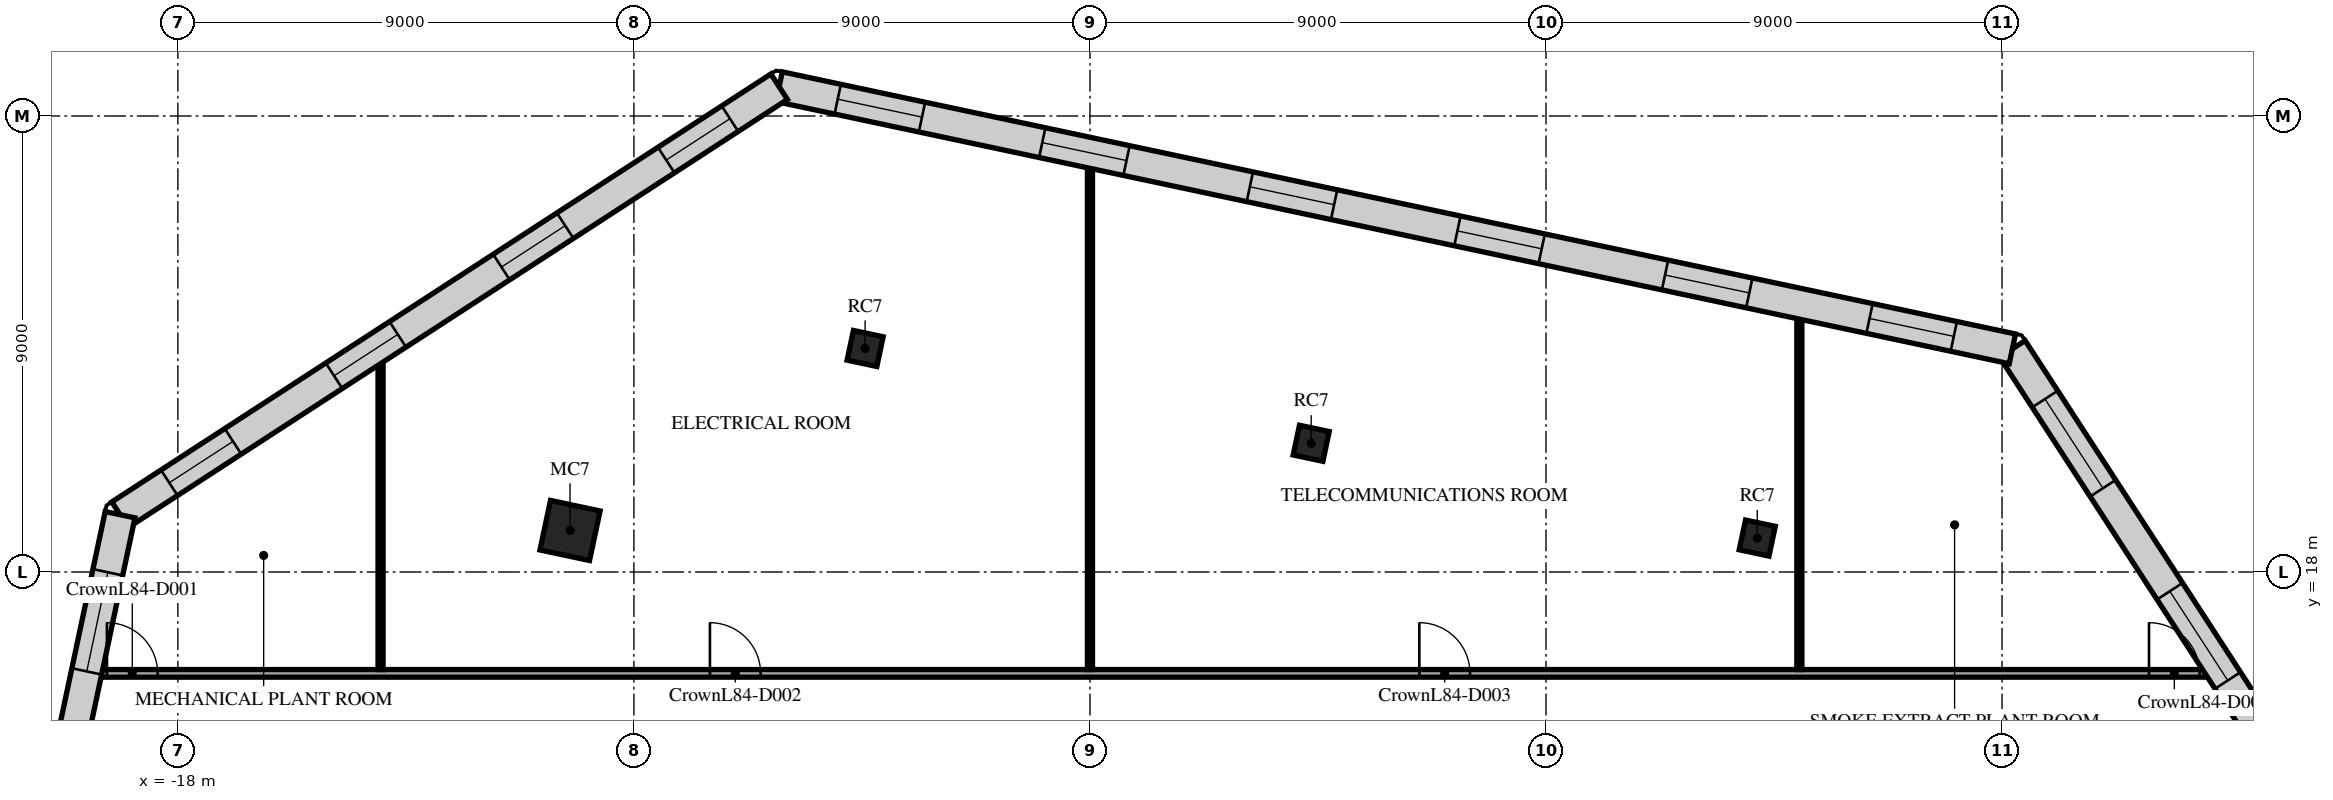
"""IFC4 building model, lengths in metres.
Left out: names, types, materials, properties, quantities, classifications, styles, units other than length and angle.
Written with IfcOpenShell. Run it as: python <this file> out.ifc"""

import sys

from ifc_helpers import new_model, si_unit, direction, frame, frame_2d, origin, origin_2d, place, context, subcontext, project, spatial, rectangle, extrude, element, fill, save


model = new_model("IFC4")
c1 = context("Model", 3, precision=1e-05, world=origin(), true_north=direction((0.0, 1.0)))
c2 = subcontext(c1, "Body", "Model", "MODEL_VIEW")
j1 = project(units=[si_unit("LENGTHUNIT", "METRE"), si_unit("PLANEANGLEUNIT", "RADIAN")], contexts=[c1])
p1 = place(None, origin())
s1 = spatial("IfcSite", under=j1, at=p1, CompositionType="ELEMENT")
p2 = place(p1, origin())
s2 = spatial("IfcBuilding", under=s1, at=p2, CompositionType="ELEMENT")
p3 = place(p2, frame((0.0, 0.0, 358.1)))
s3 = spatial("IfcBuildingStorey", under=s2, at=p3, CompositionType="ELEMENT", Elevation=358.1)
p4 = place(p3, frame((-10.261, 18.82, 0.0), z_axis=(0.0, 0.0, 1.0), x_axis=(0.207911690818, 0.978147600734, 0.0)))
e1 = element("IfcColumn", 1, at=p4, inside=s3, PredefinedType="COLUMN", context=c2, shape_type="SweptSolid", body=[
    extrude(rectangle(XDim=1.0, YDim=1.0, at=origin_2d()), origin(), (0.0, 0.0, 1.0), 5.0),
])
for number, where, z_axis, x_axis in (
    (2, (13.169, 18.67, 0.0), (0.0, 0.0, 1.0), (0.208, 0.978, 0.0)),
    (3, (4.366, 20.541, 0.0), (0.0, 0.0, 1.0), (0.208, 0.978, 0.0)),
    (4, (-4.437, 22.412, 0.0), (0.0, 0.0, 1.0), (0.208, 0.978, 0.0)),
):
    element("IfcColumn", number, at=place(p3, frame(where, z_axis=z_axis, x_axis=x_axis)), inside=s3, PredefinedType="COLUMN", context=c2, shape_type="SweptSolid", body=[
        extrude(rectangle(XDim=0.6, YDim=0.6, at=origin_2d()), origin(), (0.0, 0.0, 1.0), 5.0),
    ])
p5 = place(p3, frame((-19.704, 16.0, 0.0), z_axis=(0.0, 0.0, 1.0), x_axis=(1.0, 0.0, 0.0)))
e5 = element("IfcWall", 5, at=p5, inside=s3, PredefinedType="PARTITIONING", context=c2, shape_type="SweptSolid", body=[
    extrude(rectangle(XDim=41.948, YDim=0.15, at=frame_2d((20.974, 0.0))), origin(), (0.0, 0.0, 1.0), 4.32),
])
p6 = place(p5, frame((0.304, 0.0, 0.0)))
e6 = element("IfcOpeningElement", 6, at=p6, cuts=e5, PredefinedType="OPENING", context=c2, shape_type="SweptSolid", body=[
    extrude(rectangle(XDim=1.0, YDim=2.1, at=frame_2d((0.5, 1.05))), frame((0.0, 0.085, 0.0), z_axis=(0.0, -1.0, 0.0), x_axis=(1.0, 0.0, 0.0)), (0.0, 0.0, 1.0), 0.17),
])
p7 = place(p5, frame((12.204, 0.0, 0.0)))
e7 = element("IfcOpeningElement", 7, at=p7, cuts=e5, PredefinedType="OPENING", context=c2, shape_type="SweptSolid", body=[
    extrude(rectangle(XDim=1.0, YDim=2.1, at=frame_2d((0.5, 1.05))), frame((0.0, 0.085, 0.0), z_axis=(0.0, -1.0, 0.0), x_axis=(1.0, 0.0, 0.0)), (0.0, 0.0, 1.0), 0.17),
])
p8 = place(p5, frame((26.204, 0.0, 0.0)))
e8 = element("IfcOpeningElement", 8, at=p8, cuts=e5, PredefinedType="OPENING", context=c2, shape_type="SweptSolid", body=[
    extrude(rectangle(XDim=1.0, YDim=2.1, at=frame_2d((0.5, 1.05))), frame((0.0, 0.085, 0.0), z_axis=(0.0, -1.0, 0.0), x_axis=(1.0, 0.0, 0.0)), (0.0, 0.0, 1.0), 0.17),
])
p9 = place(p5, frame((40.604, 0.0, 0.0)))
e9 = element("IfcOpeningElement", 9, at=p9, cuts=e5, PredefinedType="OPENING", context=c2, shape_type="SweptSolid", body=[
    extrude(rectangle(XDim=1.0, YDim=2.1, at=frame_2d((0.5, 1.05))), frame((0.0, 0.085, 0.0), z_axis=(0.0, -1.0, 0.0), x_axis=(1.0, 0.0, 0.0)), (0.0, 0.0, 1.0), 0.17),
])
p10 = place(p3, frame((-14.0, 16.075, 0.0), z_axis=(0.0, 0.0, 1.0), x_axis=(0.0, 1.0, 0.0)))
e10 = element("IfcWall", 10, at=p10, inside=s3, PredefinedType="PARTITIONING", context=c2, shape_type="SweptSolid", body=[
    extrude(rectangle(XDim=6.275, YDim=0.1, at=frame_2d((3.138, 0.0))), origin(), (0.0, 0.0, 1.0), 4.7),
])
p11 = place(p3, frame((0.0, 16.075, 0.0), z_axis=(0.0, 0.0, 1.0), x_axis=(0.0, 1.0, 0.0)))
e11 = element("IfcWall", 11, at=p11, inside=s3, PredefinedType="PARTITIONING", context=c2, shape_type="SweptSolid", body=[
    extrude(rectangle(XDim=10.097, YDim=0.1, at=frame_2d((5.048, 0.0))), origin(), (0.0, 0.0, 1.0), 4.7),
])
p12 = place(p3, frame((14.0, 16.075, 0.0), z_axis=(0.0, 0.0, 1.0), x_axis=(0.0, 1.0, 0.0)))
e12 = element("IfcWall", 12, at=p12, inside=s3, PredefinedType="PARTITIONING", context=c2, shape_type="SweptSolid", body=[
    extrude(rectangle(XDim=7.121, YDim=0.1, at=frame_2d((3.561, 0.0))), origin(), (0.0, 0.0, 1.0), 4.32),
])
p13 = place(p3, frame((25.561, 11.075, 0.0), z_axis=(0.0, 0.0, 1.0), x_axis=(-0.544642093959, 0.838668581436, 0.0)))
e13 = element("IfcWall", 13, at=p13, inside=s3, PredefinedType="STANDARD", context=c2, shape_type="SweptSolid", body=[
    extrude(rectangle(XDim=13.509, YDim=0.6, at=frame_2d((6.754, 0.0))), origin(), (0.0, 0.0, 1.0), 4.7),
])
p14 = place(p13, frame((1.181, 0.0, 0.6)))
e14 = element("IfcOpeningElement", 14, at=p14, cuts=e13, PredefinedType="OPENING", context=c2, shape_type="SweptSolid", body=[
    extrude(rectangle(XDim=2.1, YDim=3.35, at=frame_2d((1.05, 1.675))), frame((0.0, 0.31, 0.0), z_axis=(0.0, -1.0, 0.0), x_axis=(1.0, 0.0, 0.0)), (0.0, 0.0, 1.0), 0.62),
])
p15 = place(p13, frame((5.704, 0.0, 0.6)))
e15 = element("IfcOpeningElement", 15, at=p15, cuts=e13, PredefinedType="OPENING", context=c2, shape_type="SweptSolid", body=[
    extrude(rectangle(XDim=2.1, YDim=3.35, at=frame_2d((1.05, 1.675))), frame((0.0, 0.31, 0.0), z_axis=(0.0, -1.0, 0.0), x_axis=(1.0, 0.0, 0.0)), (0.0, 0.0, 1.0), 0.62),
])
p16 = place(p13, frame((10.228, 0.0, 0.6)))
e16 = element("IfcOpeningElement", 16, at=p16, cuts=e13, PredefinedType="OPENING", context=c2, shape_type="SweptSolid", body=[
    extrude(rectangle(XDim=2.1, YDim=3.35, at=frame_2d((1.05, 1.675))), frame((0.0, 0.31, 0.0), z_axis=(0.0, -1.0, 0.0), x_axis=(1.0, 0.0, 0.0)), (0.0, 0.0, 1.0), 0.62),
])
p17 = place(p3, frame((18.204, 22.405, 0.0), z_axis=(0.0, 0.0, 1.0), x_axis=(-0.978147852091, 0.20791050827, 0.0)))
e17 = element("IfcWall", 17, at=p17, inside=s3, PredefinedType="STANDARD", context=c2, shape_type="SweptSolid", body=[
    extrude(rectangle(XDim=24.881, YDim=0.6, at=frame_2d((12.441, 0.0))), origin(), (0.0, 0.0, 1.0), 4.7),
])
p18 = place(p17, frame((1.182, 0.0, 0.6)))
e18 = element("IfcOpeningElement", 18, at=p18, cuts=e17, PredefinedType="OPENING", context=c2, shape_type="SweptSolid", body=[
    extrude(rectangle(XDim=1.7, YDim=3.35, at=frame_2d((0.85, 1.675))), frame((0.0, 0.31, 0.0), z_axis=(0.0, -1.0, 0.0), x_axis=(1.0, 0.0, 0.0)), (0.0, 0.0, 1.0), 0.62),
])
p19 = place(p17, frame((5.308, 0.0, 0.6)))
e19 = element("IfcOpeningElement", 19, at=p19, cuts=e17, PredefinedType="OPENING", context=c2, shape_type="SweptSolid", body=[
    extrude(rectangle(XDim=1.7, YDim=3.35, at=frame_2d((0.85, 1.675))), frame((0.0, 0.31, 0.0), z_axis=(0.0, -1.0, 0.0), x_axis=(1.0, 0.0, 0.0)), (0.0, 0.0, 1.0), 0.62),
])
p20 = place(p17, frame((9.497, 0.0, 0.6)))
e20 = element("IfcOpeningElement", 20, at=p20, cuts=e17, PredefinedType="OPENING", context=c2, shape_type="SweptSolid", body=[
    extrude(rectangle(XDim=1.7, YDim=3.35, at=frame_2d((0.85, 1.675))), frame((0.0, 0.31, 0.0), z_axis=(0.0, -1.0, 0.0), x_axis=(1.0, 0.0, 0.0)), (0.0, 0.0, 1.0), 0.62),
])
p21 = place(p17, frame((13.685, 0.0, 0.6)))
e21 = element("IfcOpeningElement", 21, at=p21, cuts=e17, PredefinedType="OPENING", context=c2, shape_type="SweptSolid", body=[
    extrude(rectangle(XDim=1.7, YDim=3.35, at=frame_2d((0.85, 1.675))), frame((0.0, 0.31, 0.0), z_axis=(0.0, -1.0, 0.0), x_axis=(1.0, 0.0, 0.0)), (0.0, 0.0, 1.0), 0.62),
])
p22 = place(p17, frame((17.873, 0.0, 0.6)))
e22 = element("IfcOpeningElement", 22, at=p22, cuts=e17, PredefinedType="OPENING", context=c2, shape_type="SweptSolid", body=[
    extrude(rectangle(XDim=1.7, YDim=3.35, at=frame_2d((0.85, 1.675))), frame((0.0, 0.31, 0.0), z_axis=(0.0, -1.0, 0.0), x_axis=(1.0, 0.0, 0.0)), (0.0, 0.0, 1.0), 0.62),
])
p23 = place(p17, frame((22.0, 0.0, 0.6)))
e23 = element("IfcOpeningElement", 23, at=p23, cuts=e17, PredefinedType="OPENING", context=c2, shape_type="SweptSolid", body=[
    extrude(rectangle(XDim=1.7, YDim=3.35, at=frame_2d((0.85, 1.675))), frame((0.0, 0.31, 0.0), z_axis=(0.0, -1.0, 0.0), x_axis=(1.0, 0.0, 0.0)), (0.0, 0.0, 1.0), 0.62),
])
p24 = place(p3, frame((-6.134, 27.578, 0.0), z_axis=(0.0, 0.0, 1.0), x_axis=(-0.838669409806, -0.544640818389, 0.0)))
e24 = element("IfcWall", 24, at=p24, inside=s3, PredefinedType="STANDARD", context=c2, shape_type="SweptSolid", body=[
    extrude(rectangle(XDim=15.509, YDim=0.6, at=frame_2d((7.754, 0.0))), origin(), (0.0, 0.0, 1.0), 4.7),
])
p25 = place(p24, frame((1.157, 0.0, 0.6)))
e25 = element("IfcOpeningElement", 25, at=p25, cuts=e24, PredefinedType="OPENING", context=c2, shape_type="SweptSolid", body=[
    extrude(rectangle(XDim=1.5, YDim=3.35, at=frame_2d((0.75, 1.675))), frame((0.0, 0.31, 0.0), z_axis=(0.0, -1.0, 0.0), x_axis=(1.0, 0.0, 0.0)), (0.0, 0.0, 1.0), 0.62),
])
p26 = place(p24, frame((5.035, 0.0, 0.6)))
e26 = element("IfcOpeningElement", 26, at=p26, cuts=e24, PredefinedType="OPENING", context=c2, shape_type="SweptSolid", body=[
    extrude(rectangle(XDim=1.5, YDim=3.35, at=frame_2d((0.75, 1.675))), frame((0.0, 0.31, 0.0), z_axis=(0.0, -1.0, 0.0), x_axis=(1.0, 0.0, 0.0)), (0.0, 0.0, 1.0), 0.62),
])
p27 = place(p24, frame((8.974, 0.0, 0.6)))
e27 = element("IfcOpeningElement", 27, at=p27, cuts=e24, PredefinedType="OPENING", context=c2, shape_type="SweptSolid", body=[
    extrude(rectangle(XDim=1.5, YDim=3.35, at=frame_2d((0.75, 1.675))), frame((0.0, 0.31, 0.0), z_axis=(0.0, -1.0, 0.0), x_axis=(1.0, 0.0, 0.0)), (0.0, 0.0, 1.0), 0.62),
])
p28 = place(p24, frame((12.851, 0.0, 0.6)))
e28 = element("IfcOpeningElement", 28, at=p28, cuts=e24, PredefinedType="OPENING", context=c2, shape_type="SweptSolid", body=[
    extrude(rectangle(XDim=1.5, YDim=3.35, at=frame_2d((0.75, 1.675))), frame((0.0, 0.31, 0.0), z_axis=(0.0, -1.0, 0.0), x_axis=(1.0, 0.0, 0.0)), (0.0, 0.0, 1.0), 0.62),
])
p29 = place(p3, frame((-19.141, 19.131, 0.0), z_axis=(0.0, 0.0, 1.0), x_axis=(-0.207913406719, -0.978147236006, 0.0)))
e29 = element("IfcWall", 29, at=p29, inside=s3, PredefinedType="STANDARD", context=c2, shape_type="SweptSolid", body=[
    extrude(rectangle(XDim=30.881, YDim=0.6, at=frame_2d((15.441, 0.0))), origin(), (0.0, 0.0, 1.0), 4.7),
])
p30 = place(p29, frame((1.161, 0.0, 0.6)))
e30 = element("IfcOpeningElement", 30, at=p30, cuts=e29, PredefinedType="OPENING", context=c2, shape_type="SweptSolid", body=[
    extrude(rectangle(XDim=2.0, YDim=3.35, at=frame_2d((1.0, 1.675))), frame((0.0, 0.31, 0.0), z_axis=(0.0, -1.0, 0.0), x_axis=(1.0, 0.0, 0.0)), (0.0, 0.0, 1.0), 0.62),
])
p31 = place(p29, frame((5.546, 0.0, 0.6)))
e31 = element("IfcOpeningElement", 31, at=p31, cuts=e29, PredefinedType="OPENING", context=c2, shape_type="SweptSolid", body=[
    extrude(rectangle(XDim=2.0, YDim=3.35, at=frame_2d((1.0, 1.675))), frame((0.0, 0.31, 0.0), z_axis=(0.0, -1.0, 0.0), x_axis=(1.0, 0.0, 0.0)), (0.0, 0.0, 1.0), 0.62),
])
p32 = place(p29, frame((9.994, 0.0, 0.6)))
e32 = element("IfcOpeningElement", 32, at=p32, cuts=e29, PredefinedType="OPENING", context=c2, shape_type="SweptSolid", body=[
    extrude(rectangle(XDim=2.0, YDim=3.35, at=frame_2d((1.0, 1.675))), frame((0.0, 0.31, 0.0), z_axis=(0.0, -1.0, 0.0), x_axis=(1.0, 0.0, 0.0)), (0.0, 0.0, 1.0), 0.62),
])
p33 = place(p29, frame((14.441, 0.0, 0.6)))
e33 = element("IfcOpeningElement", 33, at=p33, cuts=e29, PredefinedType="OPENING", context=c2, shape_type="SweptSolid", body=[
    extrude(rectangle(XDim=2.0, YDim=3.35, at=frame_2d((1.0, 1.675))), frame((0.0, 0.31, 0.0), z_axis=(0.0, -1.0, 0.0), x_axis=(1.0, 0.0, 0.0)), (0.0, 0.0, 1.0), 0.62),
])
p34 = place(p29, frame((18.888, 0.0, 0.6)))
e34 = element("IfcOpeningElement", 34, at=p34, cuts=e29, PredefinedType="OPENING", context=c2, shape_type="SweptSolid", body=[
    extrude(rectangle(XDim=2.0, YDim=3.35, at=frame_2d((1.0, 1.675))), frame((0.0, 0.31, 0.0), z_axis=(0.0, -1.0, 0.0), x_axis=(1.0, 0.0, 0.0)), (0.0, 0.0, 1.0), 0.62),
])
p35 = place(p29, frame((23.335, 0.0, 0.6)))
e35 = element("IfcOpeningElement", 35, at=p35, cuts=e29, PredefinedType="OPENING", context=c2, shape_type="SweptSolid", body=[
    extrude(rectangle(XDim=2.0, YDim=3.35, at=frame_2d((1.0, 1.675))), frame((0.0, 0.31, 0.0), z_axis=(0.0, -1.0, 0.0), x_axis=(1.0, 0.0, 0.0)), (0.0, 0.0, 1.0), 0.62),
])
p36 = place(p29, frame((27.72, 0.0, 0.6)))
e36 = element("IfcOpeningElement", 36, at=p36, cuts=e29, PredefinedType="OPENING", context=c2, shape_type="SweptSolid", body=[
    extrude(rectangle(XDim=2.0, YDim=3.35, at=frame_2d((1.0, 1.675))), frame((0.0, 0.31, 0.0), z_axis=(0.0, -1.0, 0.0), x_axis=(1.0, 0.0, 0.0)), (0.0, 0.0, 1.0), 0.62),
])
p37 = place(p6, origin())
e37 = element("IfcDoor", 37, at=p37, inside=s3, OperationType="SINGLE_SWING_LEFT", PredefinedType="DOOR", context=c2, shape_type="SweptSolid", body=[
    extrude(rectangle(XDim=1.0, YDim=2.1, at=frame_2d((0.5, 1.05))), frame((0.0, 0.025, 0.0), z_axis=(0.0, -1.0, 0.0), x_axis=(1.0, 0.0, 0.0)), (0.0, 0.0, 1.0), 0.05),
])
fill(e6, e37)
p38 = place(p7, origin())
e38 = element("IfcDoor", 38, at=p38, inside=s3, OperationType="SINGLE_SWING_RIGHT", PredefinedType="DOOR", context=c2, shape_type="SweptSolid", body=[
    extrude(rectangle(XDim=1.0, YDim=2.1, at=frame_2d((0.5, 1.05))), frame((0.0, 0.025, 0.0), z_axis=(0.0, -1.0, 0.0), x_axis=(1.0, 0.0, 0.0)), (0.0, 0.0, 1.0), 0.05),
])
fill(e7, e38)
p39 = place(p8, origin())
e39 = element("IfcDoor", 39, at=p39, inside=s3, OperationType="SINGLE_SWING_LEFT", PredefinedType="DOOR", context=c2, shape_type="SweptSolid", body=[
    extrude(rectangle(XDim=1.0, YDim=2.1, at=frame_2d((0.5, 1.05))), frame((0.0, 0.025, 0.0), z_axis=(0.0, -1.0, 0.0), x_axis=(1.0, 0.0, 0.0)), (0.0, 0.0, 1.0), 0.05),
])
fill(e8, e39)
p40 = place(p9, origin())
e40 = element("IfcDoor", 40, at=p40, inside=s3, OperationType="SINGLE_SWING_RIGHT", PredefinedType="DOOR", context=c2, shape_type="SweptSolid", body=[
    extrude(rectangle(XDim=1.0, YDim=2.1, at=frame_2d((0.5, 1.05))), frame((0.0, 0.025, 0.0), z_axis=(0.0, -1.0, 0.0), x_axis=(1.0, 0.0, 0.0)), (0.0, 0.0, 1.0), 0.05),
])
fill(e9, e40)
p41 = place(p15, origin())
e41 = element("IfcWindow", 41, at=p41, inside=s3, PartitioningType="SINGLE_PANEL", PredefinedType="USERDEFINED", context=c2, shape_type="SweptSolid", body=[
    extrude(rectangle(XDim=2.1, YDim=3.35, at=frame_2d((1.05, 1.675))), frame((0.0, 0.03, 0.0), z_axis=(0.0, -1.0, 0.0), x_axis=(1.0, 0.0, 0.0)), (0.0, 0.0, 1.0), 0.06),
])
fill(e15, e41)
p42 = place(p16, origin())
e42 = element("IfcWindow", 42, at=p42, inside=s3, PartitioningType="SINGLE_PANEL", PredefinedType="USERDEFINED", context=c2, shape_type="SweptSolid", body=[
    extrude(rectangle(XDim=2.1, YDim=3.35, at=frame_2d((1.05, 1.675))), frame((0.0, 0.03, 0.0), z_axis=(0.0, -1.0, 0.0), x_axis=(1.0, 0.0, 0.0)), (0.0, 0.0, 1.0), 0.06),
])
fill(e16, e42)
p43 = place(p18, origin())
e43 = element("IfcWindow", 43, at=p43, inside=s3, PartitioningType="SINGLE_PANEL", PredefinedType="USERDEFINED", context=c2, shape_type="SweptSolid", body=[
    extrude(rectangle(XDim=1.7, YDim=3.35, at=frame_2d((0.85, 1.675))), frame((0.0, 0.03, 0.0), z_axis=(0.0, -1.0, 0.0), x_axis=(1.0, 0.0, 0.0)), (0.0, 0.0, 1.0), 0.06),
])
fill(e18, e43)
p44 = place(p19, origin())
e44 = element("IfcWindow", 44, at=p44, inside=s3, PartitioningType="SINGLE_PANEL", PredefinedType="USERDEFINED", context=c2, shape_type="SweptSolid", body=[
    extrude(rectangle(XDim=1.7, YDim=3.35, at=frame_2d((0.85, 1.675))), frame((0.0, 0.03, 0.0), z_axis=(0.0, -1.0, 0.0), x_axis=(1.0, 0.0, 0.0)), (0.0, 0.0, 1.0), 0.06),
])
fill(e19, e44)
p45 = place(p20, origin())
e45 = element("IfcWindow", 45, at=p45, inside=s3, PartitioningType="SINGLE_PANEL", PredefinedType="USERDEFINED", context=c2, shape_type="SweptSolid", body=[
    extrude(rectangle(XDim=1.7, YDim=3.35, at=frame_2d((0.85, 1.675))), frame((0.0, 0.03, 0.0), z_axis=(0.0, -1.0, 0.0), x_axis=(1.0, 0.0, 0.0)), (0.0, 0.0, 1.0), 0.06),
])
fill(e20, e45)
p46 = place(p21, origin())
e46 = element("IfcWindow", 46, at=p46, inside=s3, PartitioningType="SINGLE_PANEL", PredefinedType="USERDEFINED", context=c2, shape_type="SweptSolid", body=[
    extrude(rectangle(XDim=1.7, YDim=3.35, at=frame_2d((0.85, 1.675))), frame((0.0, 0.03, 0.0), z_axis=(0.0, -1.0, 0.0), x_axis=(1.0, 0.0, 0.0)), (0.0, 0.0, 1.0), 0.06),
])
fill(e21, e46)
p47 = place(p22, origin())
e47 = element("IfcWindow", 47, at=p47, inside=s3, PartitioningType="SINGLE_PANEL", PredefinedType="USERDEFINED", context=c2, shape_type="SweptSolid", body=[
    extrude(rectangle(XDim=1.7, YDim=3.35, at=frame_2d((0.85, 1.675))), frame((0.0, 0.03, 0.0), z_axis=(0.0, -1.0, 0.0), x_axis=(1.0, 0.0, 0.0)), (0.0, 0.0, 1.0), 0.06),
])
fill(e22, e47)
p48 = place(p23, origin())
e48 = element("IfcWindow", 48, at=p48, inside=s3, PartitioningType="SINGLE_PANEL", PredefinedType="USERDEFINED", context=c2, shape_type="SweptSolid", body=[
    extrude(rectangle(XDim=1.7, YDim=3.35, at=frame_2d((0.85, 1.675))), frame((0.0, 0.03, 0.0), z_axis=(0.0, -1.0, 0.0), x_axis=(1.0, 0.0, 0.0)), (0.0, 0.0, 1.0), 0.06),
])
fill(e23, e48)
p49 = place(p25, origin())
e49 = element("IfcWindow", 49, at=p49, inside=s3, PartitioningType="SINGLE_PANEL", PredefinedType="USERDEFINED", context=c2, shape_type="SweptSolid", body=[
    extrude(rectangle(XDim=1.5, YDim=3.35, at=frame_2d((0.75, 1.675))), frame((0.0, 0.03, 0.0), z_axis=(0.0, -1.0, 0.0), x_axis=(1.0, 0.0, 0.0)), (0.0, 0.0, 1.0), 0.06),
])
fill(e25, e49)
p50 = place(p26, origin())
e50 = element("IfcWindow", 50, at=p50, inside=s3, PartitioningType="SINGLE_PANEL", PredefinedType="USERDEFINED", context=c2, shape_type="SweptSolid", body=[
    extrude(rectangle(XDim=1.5, YDim=3.35, at=frame_2d((0.75, 1.675))), frame((0.0, 0.03, 0.0), z_axis=(0.0, -1.0, 0.0), x_axis=(1.0, 0.0, 0.0)), (0.0, 0.0, 1.0), 0.06),
])
fill(e26, e50)
p51 = place(p27, origin())
e51 = element("IfcWindow", 51, at=p51, inside=s3, PartitioningType="SINGLE_PANEL", PredefinedType="USERDEFINED", context=c2, shape_type="SweptSolid", body=[
    extrude(rectangle(XDim=1.5, YDim=3.35, at=frame_2d((0.75, 1.675))), frame((0.0, 0.03, 0.0), z_axis=(0.0, -1.0, 0.0), x_axis=(1.0, 0.0, 0.0)), (0.0, 0.0, 1.0), 0.06),
])
fill(e27, e51)
p52 = place(p28, origin())
e52 = element("IfcWindow", 52, at=p52, inside=s3, PartitioningType="SINGLE_PANEL", PredefinedType="USERDEFINED", context=c2, shape_type="SweptSolid", body=[
    extrude(rectangle(XDim=1.5, YDim=3.35, at=frame_2d((0.75, 1.675))), frame((0.0, 0.03, 0.0), z_axis=(0.0, -1.0, 0.0), x_axis=(1.0, 0.0, 0.0)), (0.0, 0.0, 1.0), 0.06),
])
fill(e28, e52)
p53 = place(p30, origin())
e53 = element("IfcWindow", 53, at=p53, inside=s3, PartitioningType="SINGLE_PANEL", PredefinedType="USERDEFINED", context=c2, shape_type="SweptSolid", body=[
    extrude(rectangle(XDim=2.0, YDim=3.35, at=frame_2d((1.0, 1.675))), frame((0.0, 0.03, 0.0), z_axis=(0.0, -1.0, 0.0), x_axis=(1.0, 0.0, 0.0)), (0.0, 0.0, 1.0), 0.06),
])
fill(e30, e53)
save(model, sys.argv[1])
